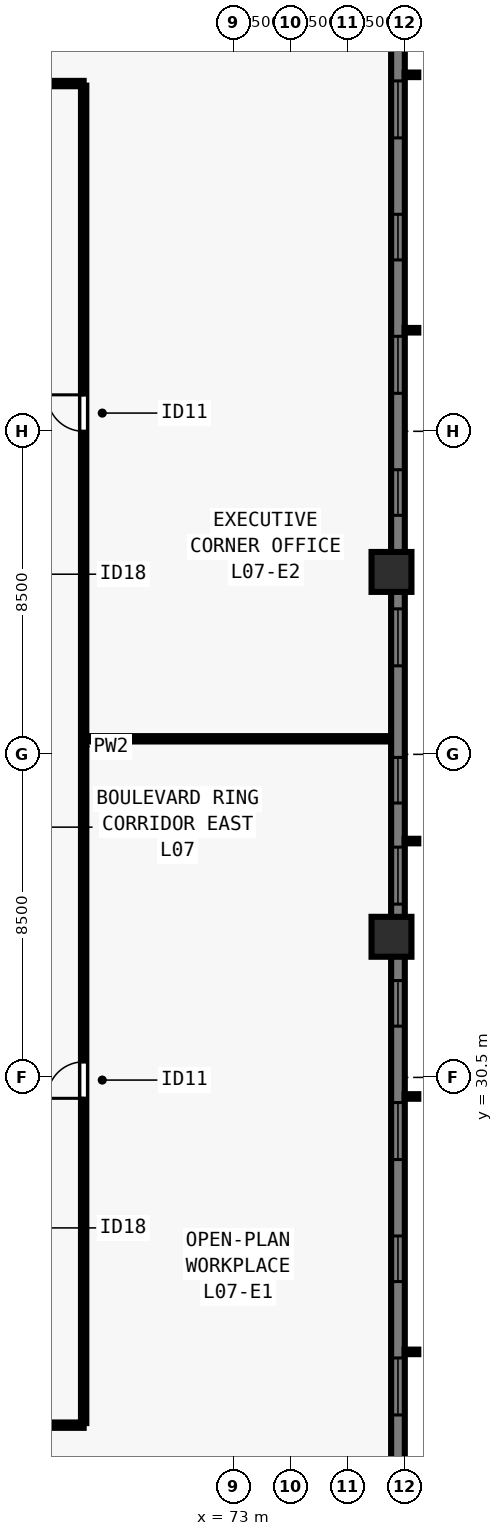
"""IFC4 building model, lengths in metres.
Left out: names, types, materials, properties, quantities, classifications, styles, units other than length and angle.
Written with IfcOpenShell. Run it as: python <this file> out.ifc"""

import sys

from ifc_helpers import new_model, si_unit, direction, frame, frame_2d, origin, origin_2d, place, context, subcontext, project, spatial, rectangle, extrude, element, fill, save


model = new_model("IFC4")
c1 = context("Model", 3, precision=1e-05, world=origin(), true_north=direction((0.0, 1.0)))
c2 = subcontext(c1, "Body", "Model", "MODEL_VIEW")
j1 = project(units=[si_unit("LENGTHUNIT", "METRE"), si_unit("PLANEANGLEUNIT", "RADIAN")], contexts=[c1])
p1 = place(None, origin())
s1 = spatial("IfcSite", under=j1, at=p1, CompositionType="ELEMENT")
p2 = place(p1, origin())
s2 = spatial("IfcBuilding", under=s1, at=p2, CompositionType="ELEMENT")
p3 = place(p2, frame((0.0, 0.0, 30.5)))
s3 = spatial("IfcBuildingStorey", under=s2, at=p3, CompositionType="ELEMENT", Elevation=30.5)
for number, where, z_axis, x_axis in (
    (1, (77.15, 34.2, 0.0), (0.0, 0.0, 1.0), (0.0, 1.0, 0.0)),
    (2, (77.15, 43.8, 0.0), (0.0, 0.0, 1.0), (0.0, 1.0, 0.0)),
):
    element("IfcColumn", number, at=place(p3, frame(where, z_axis=z_axis, x_axis=x_axis)), inside=s3, PredefinedType="COLUMN", context=c2, shape_type="SweptSolid", body=[
        extrude(rectangle(XDim=1.05, YDim=1.05, at=origin_2d()), origin(), (0.0, 0.0, 1.0), 3.5),
    ])
p4 = place(p3, frame((77.32, 61.5, 0.0), z_axis=(0.0, 0.0, 1.0), x_axis=(0.0, -1.0, 0.0)))
e3 = element("IfcWall", 3, at=p4, inside=s3, PredefinedType="SOLIDWALL", context=c2, shape_type="SweptSolid", body=[
    extrude(rectangle(XDim=44.662, YDim=0.36, at=frame_2d((22.331, 0.0))), origin(), (0.0, 0.0, 1.0), 3.28),
])
p5 = place(p4, frame((4.78, 0.0, 0.8)))
e4 = element("IfcOpeningElement", 4, at=p5, cuts=e3, PredefinedType="OPENING", context=c2, shape_type="SweptSolid", body=[
    extrude(rectangle(XDim=1.5, YDim=1.544, at=frame_2d((0.75, 0.772))), frame((0.0, 0.19, 0.0), z_axis=(0.0, -1.0, 0.0), x_axis=(1.0, 0.0, 0.0)), (0.0, 0.0, 1.0), 0.38),
])
p6 = place(p4, frame((8.29, 0.0, 0.8)))
e5 = element("IfcOpeningElement", 5, at=p6, cuts=e3, PredefinedType="OPENING", context=c2, shape_type="SweptSolid", body=[
    extrude(rectangle(XDim=1.2, YDim=1.544, at=frame_2d((0.6, 0.772))), frame((0.0, 0.19, 0.0), z_axis=(0.0, -1.0, 0.0), x_axis=(1.0, 0.0, 0.0)), (0.0, 0.0, 1.0), 0.38),
])
p7 = place(p4, frame((11.5, 0.0, 0.8)))
e6 = element("IfcOpeningElement", 6, at=p7, cuts=e3, PredefinedType="OPENING", context=c2, shape_type="SweptSolid", body=[
    extrude(rectangle(XDim=1.5, YDim=1.544, at=frame_2d((0.75, 0.772))), frame((0.0, 0.19, 0.0), z_axis=(0.0, -1.0, 0.0), x_axis=(1.0, 0.0, 0.0)), (0.0, 0.0, 1.0), 0.38),
])
p8 = place(p4, frame((15.01, 0.0, 0.8)))
e7 = element("IfcOpeningElement", 7, at=p8, cuts=e3, PredefinedType="OPENING", context=c2, shape_type="SweptSolid", body=[
    extrude(rectangle(XDim=1.2, YDim=1.544, at=frame_2d((0.6, 0.772))), frame((0.0, 0.19, 0.0), z_axis=(0.0, -1.0, 0.0), x_axis=(1.0, 0.0, 0.0)), (0.0, 0.0, 1.0), 0.38),
])
p9 = place(p4, frame((18.671, 0.0, 0.8)))
e8 = element("IfcOpeningElement", 8, at=p9, cuts=e3, PredefinedType="OPENING", context=c2, shape_type="SweptSolid", body=[
    extrude(rectangle(XDim=1.5, YDim=1.544, at=frame_2d((0.75, 0.772))), frame((0.0, 0.19, 0.0), z_axis=(0.0, -1.0, 0.0), x_axis=(1.0, 0.0, 0.0)), (0.0, 0.0, 1.0), 0.38),
])
p10 = place(p4, frame((22.581, 0.0, 0.8)))
e9 = element("IfcOpeningElement", 9, at=p10, cuts=e3, PredefinedType="OPENING", context=c2, shape_type="SweptSolid", body=[
    extrude(rectangle(XDim=1.2, YDim=1.544, at=frame_2d((0.6, 0.772))), frame((0.0, 0.19, 0.0), z_axis=(0.0, -1.0, 0.0), x_axis=(1.0, 0.0, 0.0)), (0.0, 0.0, 1.0), 0.38),
])
p11 = place(p4, frame((24.941, 0.0, 0.8)))
e10 = element("IfcOpeningElement", 10, at=p11, cuts=e3, PredefinedType="OPENING", context=c2, shape_type="SweptSolid", body=[
    extrude(rectangle(XDim=1.5, YDim=1.544, at=frame_2d((0.75, 0.772))), frame((0.0, 0.19, 0.0), z_axis=(0.0, -1.0, 0.0), x_axis=(1.0, 0.0, 0.0)), (0.0, 0.0, 1.0), 0.38),
])
p12 = place(p4, frame((28.451, 0.0, 0.8)))
e11 = element("IfcOpeningElement", 11, at=p12, cuts=e3, PredefinedType="OPENING", context=c2, shape_type="SweptSolid", body=[
    extrude(rectangle(XDim=1.2, YDim=1.544, at=frame_2d((0.6, 0.772))), frame((0.0, 0.19, 0.0), z_axis=(0.0, -1.0, 0.0), x_axis=(1.0, 0.0, 0.0)), (0.0, 0.0, 1.0), 0.38),
])
p13 = place(p4, frame((31.662, 0.0, 0.8)))
e12 = element("IfcOpeningElement", 12, at=p13, cuts=e3, PredefinedType="OPENING", context=c2, shape_type="SweptSolid", body=[
    extrude(rectangle(XDim=1.5, YDim=1.544, at=frame_2d((0.75, 0.772))), frame((0.0, 0.19, 0.0), z_axis=(0.0, -1.0, 0.0), x_axis=(1.0, 0.0, 0.0)), (0.0, 0.0, 1.0), 0.38),
])
p14 = place(p4, frame((35.172, 0.0, 0.8)))
e13 = element("IfcOpeningElement", 13, at=p14, cuts=e3, PredefinedType="OPENING", context=c2, shape_type="SweptSolid", body=[
    extrude(rectangle(XDim=1.2, YDim=1.544, at=frame_2d((0.6, 0.772))), frame((0.0, 0.19, 0.0), z_axis=(0.0, -1.0, 0.0), x_axis=(1.0, 0.0, 0.0)), (0.0, 0.0, 1.0), 0.38),
])
p15 = place(p4, frame((38.382, 0.0, 0.8)))
e14 = element("IfcOpeningElement", 14, at=p15, cuts=e3, PredefinedType="OPENING", context=c2, shape_type="SweptSolid", body=[
    extrude(rectangle(XDim=1.5, YDim=1.544, at=frame_2d((0.75, 0.772))), frame((0.0, 0.19, 0.0), z_axis=(0.0, -1.0, 0.0), x_axis=(1.0, 0.0, 0.0)), (0.0, 0.0, 1.0), 0.38),
])
p16 = place(p3, frame((34.95, 21.35, 0.0), z_axis=(0.0, 0.0, 1.0), x_axis=(1.0, 0.0, 0.0)))
e15 = element("IfcWall", 15, at=p16, inside=s3, PredefinedType="PARTITIONING", context=c2, shape_type="SweptSolid", body=[
    extrude(rectangle(XDim=34.1, YDim=0.14, at=frame_2d((17.05, 0.0))), origin(), (0.0, 0.0, 1.0), 3.28),
])
p17 = place(p16, frame((3.938, 0.0, 0.0)))
e16 = element("IfcOpeningElement", 16, at=p17, cuts=e15, PredefinedType="OPENING", context=c2, shape_type="SweptSolid", body=[
    extrude(rectangle(XDim=0.96, YDim=2.12, at=frame_2d((0.48, 1.06))), frame((0.0, 0.08, 0.0), z_axis=(0.0, -1.0, 0.0), x_axis=(1.0, 0.0, 0.0)), (0.0, 0.0, 1.0), 0.16),
])
p18 = place(p16, frame((28.617, 0.0, 0.0)))
e17 = element("IfcOpeningElement", 17, at=p18, cuts=e15, PredefinedType="OPENING", context=c2, shape_type="SweptSolid", body=[
    extrude(rectangle(XDim=0.96, YDim=2.12, at=frame_2d((0.48, 1.06))), frame((0.0, 0.08, 0.0), z_axis=(0.0, -1.0, 0.0), x_axis=(1.0, 0.0, 0.0)), (0.0, 0.0, 1.0), 0.16),
])
p19 = place(p3, frame((34.95, 56.65, 0.0), z_axis=(0.0, 0.0, 1.0), x_axis=(1.0, 0.0, 0.0)))
e18 = element("IfcWall", 18, at=p19, inside=s3, PredefinedType="PARTITIONING", context=c2, shape_type="SweptSolid", body=[
    extrude(rectangle(XDim=34.1, YDim=0.14, at=frame_2d((17.05, 0.0))), origin(), (0.0, 0.0, 1.0), 3.28),
])
p20 = place(p19, frame((4.522, 0.0, 0.0)))
e19 = element("IfcOpeningElement", 19, at=p20, cuts=e18, PredefinedType="OPENING", context=c2, shape_type="SweptSolid", body=[
    extrude(rectangle(XDim=0.96, YDim=2.12, at=frame_2d((0.48, 1.06))), frame((0.0, 0.08, 0.0), z_axis=(0.0, -1.0, 0.0), x_axis=(1.0, 0.0, 0.0)), (0.0, 0.0, 1.0), 0.16),
])
p21 = place(p19, frame((29.202, 0.0, 0.0)))
e20 = element("IfcOpeningElement", 20, at=p21, cuts=e18, PredefinedType="OPENING", context=c2, shape_type="SweptSolid", body=[
    extrude(rectangle(XDim=0.96, YDim=2.12, at=frame_2d((0.48, 1.06))), frame((0.0, 0.08, 0.0), z_axis=(0.0, -1.0, 0.0), x_axis=(1.0, 0.0, 0.0)), (0.0, 0.0, 1.0), 0.16),
])
p22 = place(p3, frame((69.05, 21.405, 0.0), z_axis=(0.0, 0.0, 1.0), x_axis=(0.0, 1.0, 0.0)))
e21 = element("IfcWall", 21, at=p22, inside=s3, PredefinedType="PARTITIONING", context=c2, shape_type="SweptSolid", body=[
    extrude(rectangle(XDim=35.19, YDim=0.14, at=frame_2d((17.595, 0.0))), origin(), (0.0, 0.0, 1.0), 3.28),
])
p23 = place(p22, frame((8.545, 0.0, 0.0)))
e22 = element("IfcOpeningElement", 22, at=p23, cuts=e21, PredefinedType="OPENING", context=c2, shape_type="SweptSolid", body=[
    extrude(rectangle(XDim=0.96, YDim=2.12, at=frame_2d((0.48, 1.06))), frame((0.0, 0.08, 0.0), z_axis=(0.0, -1.0, 0.0), x_axis=(1.0, 0.0, 0.0)), (0.0, 0.0, 1.0), 0.16),
])
p24 = place(p22, frame((26.095, 0.0, 0.0)))
e23 = element("IfcOpeningElement", 23, at=p24, cuts=e21, PredefinedType="OPENING", context=c2, shape_type="SweptSolid", body=[
    extrude(rectangle(XDim=0.96, YDim=2.12, at=frame_2d((0.48, 1.06))), frame((0.0, 0.08, 0.0), z_axis=(0.0, -1.0, 0.0), x_axis=(1.0, 0.0, 0.0)), (0.0, 0.0, 1.0), 0.16),
])
p25 = place(p3, frame((69.15, 39.409, 0.0), z_axis=(0.0, 0.0, 1.0), x_axis=(1.0, 0.0, 0.0)))
e24 = element("IfcWall", 24, at=p25, inside=s3, PredefinedType="PARTITIONING", context=c2, shape_type="SweptSolid", body=[
    extrude(rectangle(XDim=7.93, YDim=0.14, at=frame_2d((3.965, 0.0))), origin(), (0.0, 0.0, 1.0), 3.28),
])
p26 = place(p5, origin())
e25 = element("IfcWindow", 25, at=p26, inside=s3, PartitioningType="SINGLE_PANEL", PredefinedType="WINDOW", context=c2, shape_type="SweptSolid", body=[
    extrude(rectangle(XDim=1.5, YDim=1.544, at=frame_2d((0.75, 0.772))), frame((0.0, -0.05, 0.0), z_axis=(0.0, -1.0, 0.0), x_axis=(1.0, 0.0, 0.0)), (0.0, 0.0, 1.0), 0.06),
])
fill(e4, e25)
p27 = place(p6, origin())
e26 = element("IfcWindow", 26, at=p27, inside=s3, PartitioningType="SINGLE_PANEL", PredefinedType="WINDOW", context=c2, shape_type="SweptSolid", body=[
    extrude(rectangle(XDim=1.2, YDim=1.544, at=frame_2d((0.6, 0.772))), frame((0.0, -0.05, 0.0), z_axis=(0.0, -1.0, 0.0), x_axis=(1.0, 0.0, 0.0)), (0.0, 0.0, 1.0), 0.06),
])
fill(e5, e26)
p28 = place(p7, origin())
e27 = element("IfcWindow", 27, at=p28, inside=s3, PartitioningType="SINGLE_PANEL", PredefinedType="WINDOW", context=c2, shape_type="SweptSolid", body=[
    extrude(rectangle(XDim=1.5, YDim=1.544, at=frame_2d((0.75, 0.772))), frame((0.0, -0.05, 0.0), z_axis=(0.0, -1.0, 0.0), x_axis=(1.0, 0.0, 0.0)), (0.0, 0.0, 1.0), 0.06),
])
fill(e6, e27)
p29 = place(p8, origin())
e28 = element("IfcWindow", 28, at=p29, inside=s3, PartitioningType="SINGLE_PANEL", PredefinedType="WINDOW", context=c2, shape_type="SweptSolid", body=[
    extrude(rectangle(XDim=1.2, YDim=1.544, at=frame_2d((0.6, 0.772))), frame((0.0, -0.05, 0.0), z_axis=(0.0, -1.0, 0.0), x_axis=(1.0, 0.0, 0.0)), (0.0, 0.0, 1.0), 0.06),
])
fill(e7, e28)
p30 = place(p9, origin())
e29 = element("IfcWindow", 29, at=p30, inside=s3, PartitioningType="SINGLE_PANEL", PredefinedType="WINDOW", context=c2, shape_type="SweptSolid", body=[
    extrude(rectangle(XDim=1.5, YDim=1.544, at=frame_2d((0.75, 0.772))), frame((0.0, -0.05, 0.0), z_axis=(0.0, -1.0, 0.0), x_axis=(1.0, 0.0, 0.0)), (0.0, 0.0, 1.0), 0.06),
])
fill(e8, e29)
p31 = place(p10, origin())
e30 = element("IfcWindow", 30, at=p31, inside=s3, PartitioningType="SINGLE_PANEL", PredefinedType="WINDOW", context=c2, shape_type="SweptSolid", body=[
    extrude(rectangle(XDim=1.2, YDim=1.544, at=frame_2d((0.6, 0.772))), frame((0.0, -0.05, 0.0), z_axis=(0.0, -1.0, 0.0), x_axis=(1.0, 0.0, 0.0)), (0.0, 0.0, 1.0), 0.06),
])
fill(e9, e30)
p32 = place(p11, origin())
e31 = element("IfcWindow", 31, at=p32, inside=s3, PartitioningType="SINGLE_PANEL", PredefinedType="WINDOW", context=c2, shape_type="SweptSolid", body=[
    extrude(rectangle(XDim=1.5, YDim=1.544, at=frame_2d((0.75, 0.772))), frame((0.0, -0.05, 0.0), z_axis=(0.0, -1.0, 0.0), x_axis=(1.0, 0.0, 0.0)), (0.0, 0.0, 1.0), 0.06),
])
fill(e10, e31)
p33 = place(p12, origin())
e32 = element("IfcWindow", 32, at=p33, inside=s3, PartitioningType="SINGLE_PANEL", PredefinedType="WINDOW", context=c2, shape_type="SweptSolid", body=[
    extrude(rectangle(XDim=1.2, YDim=1.544, at=frame_2d((0.6, 0.772))), frame((0.0, -0.05, 0.0), z_axis=(0.0, -1.0, 0.0), x_axis=(1.0, 0.0, 0.0)), (0.0, 0.0, 1.0), 0.06),
])
fill(e11, e32)
p34 = place(p13, origin())
e33 = element("IfcWindow", 33, at=p34, inside=s3, PartitioningType="SINGLE_PANEL", PredefinedType="WINDOW", context=c2, shape_type="SweptSolid", body=[
    extrude(rectangle(XDim=1.5, YDim=1.544, at=frame_2d((0.75, 0.772))), frame((0.0, -0.05, 0.0), z_axis=(0.0, -1.0, 0.0), x_axis=(1.0, 0.0, 0.0)), (0.0, 0.0, 1.0), 0.06),
])
fill(e12, e33)
p35 = place(p14, origin())
e34 = element("IfcWindow", 34, at=p35, inside=s3, PartitioningType="SINGLE_PANEL", PredefinedType="WINDOW", context=c2, shape_type="SweptSolid", body=[
    extrude(rectangle(XDim=1.2, YDim=1.544, at=frame_2d((0.6, 0.772))), frame((0.0, -0.05, 0.0), z_axis=(0.0, -1.0, 0.0), x_axis=(1.0, 0.0, 0.0)), (0.0, 0.0, 1.0), 0.06),
])
fill(e13, e34)
p36 = place(p15, origin())
e35 = element("IfcWindow", 35, at=p36, inside=s3, PartitioningType="SINGLE_PANEL", PredefinedType="WINDOW", context=c2, shape_type="SweptSolid", body=[
    extrude(rectangle(XDim=1.5, YDim=1.544, at=frame_2d((0.75, 0.772))), frame((0.0, -0.05, 0.0), z_axis=(0.0, -1.0, 0.0), x_axis=(1.0, 0.0, 0.0)), (0.0, 0.0, 1.0), 0.06),
])
fill(e14, e35)
p37 = place(p23, origin())
e36 = element("IfcDoor", 36, at=p37, inside=s3, OperationType="SINGLE_SWING_LEFT", PredefinedType="DOOR", context=c2, shape_type="SweptSolid", body=[
    extrude(rectangle(XDim=0.96, YDim=2.12, at=frame_2d((0.48, 1.06))), frame((0.0, 0.025, 0.0), z_axis=(0.0, -1.0, 0.0), x_axis=(1.0, 0.0, 0.0)), (0.0, 0.0, 1.0), 0.05),
])
fill(e22, e36)
p38 = place(p24, origin())
e37 = element("IfcDoor", 37, at=p38, inside=s3, OperationType="SINGLE_SWING_RIGHT", PredefinedType="DOOR", context=c2, shape_type="SweptSolid", body=[
    extrude(rectangle(XDim=0.96, YDim=2.12, at=frame_2d((0.48, 1.06))), frame((0.0, 0.025, 0.0), z_axis=(0.0, -1.0, 0.0), x_axis=(1.0, 0.0, 0.0)), (0.0, 0.0, 1.0), 0.05),
])
fill(e23, e37)
save(model, sys.argv[1])
